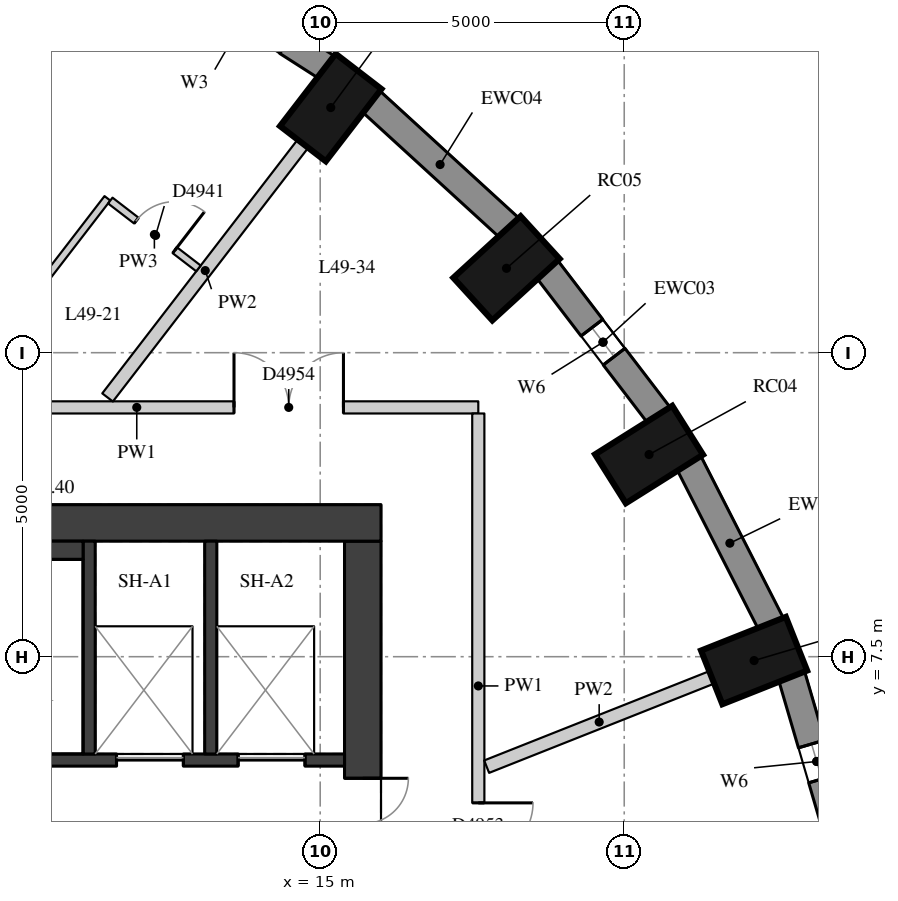
"""IFC4 building model, lengths in metres.
Left out: names, types, materials, properties, quantities, classifications, styles, units other than length and angle.
Written with IfcOpenShell. Run it as: python <this file> out.ifc"""

import sys

from ifc_helpers import new_model, si_unit, direction, frame, frame_2d, origin, origin_2d, place, context, subcontext, project, spatial, rectangle, extrude, element, fill, save


model = new_model("IFC4")
c1 = context("Model", 3, precision=1e-05, world=origin(), true_north=direction((0.0, 1.0)))
c2 = subcontext(c1, "Body", "Model", "MODEL_VIEW")
j1 = project(units=[si_unit("LENGTHUNIT", "METRE"), si_unit("PLANEANGLEUNIT", "RADIAN")], contexts=[c1])
p1 = place(None, origin())
s1 = spatial("IfcSite", under=j1, at=p1, CompositionType="ELEMENT")
p2 = place(p1, origin())
s2 = spatial("IfcBuilding", under=s1, at=p2, CompositionType="ELEMENT")
p3 = place(p2, frame((0.0, 0.0, 174.8)))
s3 = spatial("IfcBuildingStorey", under=s2, at=p3, CompositionType="ELEMENT", Elevation=174.8)
for number, where, z_axis, x_axis in (
    (1, (22.136, 7.436, 0.0), (0.0, 0.0, 1.0), (0.93, 0.369, 0.0)),
    (2, (20.408, 10.825, 0.0), (0.0, 0.0, 1.0), (0.846, 0.533, 0.0)),
    (3, (18.064, 13.888, 0.0), (0.0, 0.0, 1.0), (0.738, 0.675, 0.0)),
    (4, (15.173, 16.532, 0.0), (0.0, 0.0, 1.0), (0.61, 0.792, 0.0)),
):
    element("IfcColumn", number, at=place(p3, frame(where, z_axis=z_axis, x_axis=x_axis)), inside=s3, PredefinedType="COLUMN", context=c2, shape_type="SweptSolid", body=[
        extrude(rectangle(XDim=1.5, YDim=0.95, at=origin_2d()), origin(), (0.0, 0.0, 1.0), 3.3),
    ])
p4 = place(p3, frame((23.58, 4.362, 0.0), z_axis=(0.0, 0.0, 1.0), x_axis=(-0.281049481624, 0.959693278542, 0.0)))
e5 = element("IfcWall", 5, at=p4, inside=s3, PredefinedType="SOLIDWALL", context=c2, shape_type="SweptSolid", body=[
    extrude(rectangle(XDim=2.948, YDim=0.45, at=frame_2d((1.474, 0.0))), origin(), (0.0, 0.0, 1.0), 3.02),
])
p5 = place(p4, frame((1.174, 0.0, 0.4)))
e6 = element("IfcOpeningElement", 6, at=p5, cuts=e5, PredefinedType="OPENING", context=c2, shape_type="SweptSolid", body=[
    extrude(rectangle(XDim=0.6, YDim=1.75, at=frame_2d((0.3, 0.875))), frame((0.0, 0.235, 0.0), z_axis=(0.0, -1.0, 0.0), x_axis=(1.0, 0.0, 0.0)), (0.0, 0.0, 1.0), 0.47),
])
p6 = place(p3, frame((22.415, 8.037, 0.0), z_axis=(0.0, 0.0, 1.0), x_axis=(-0.454133999889, 0.890933392653, 0.0)))
e7 = element("IfcWall", 7, at=p6, inside=s3, PredefinedType="SOLIDWALL", context=c2, shape_type="SweptSolid", body=[
    extrude(rectangle(XDim=2.986, YDim=0.45, at=frame_2d((1.493, 0.0))), origin(), (0.0, 0.0, 1.0), 3.02),
])
p7 = place(p3, frame((20.574, 11.467, 0.0), z_axis=(0.0, 0.0, 1.0), x_axis=(-0.607817056371, 0.794077090706, 0.0)))
e8 = element("IfcWall", 8, at=p7, inside=s3, PredefinedType="SOLIDWALL", context=c2, shape_type="SweptSolid", body=[
    extrude(rectangle(XDim=3.037, YDim=0.45, at=frame_2d((1.519, 0.0))), origin(), (0.0, 0.0, 1.0), 3.02),
])
p8 = place(p7, frame((1.219, 0.0, 0.4)))
e9 = element("IfcOpeningElement", 9, at=p8, cuts=e8, PredefinedType="OPENING", context=c2, shape_type="SweptSolid", body=[
    extrude(rectangle(XDim=0.6, YDim=1.75, at=frame_2d((0.3, 0.875))), frame((0.0, 0.235, 0.0), z_axis=(0.0, -1.0, 0.0), x_axis=(1.0, 0.0, 0.0)), (0.0, 0.0, 1.0), 0.47),
])
p9 = place(p3, frame((18.113, 14.55, 0.0), z_axis=(0.0, 0.0, 1.0), x_axis=(-0.737808755941, 0.675009807082, 0.0)))
e10 = element("IfcWall", 10, at=p9, inside=s3, PredefinedType="SOLIDWALL", context=c2, shape_type="SweptSolid", body=[
    extrude(rectangle(XDim=3.094, YDim=0.45, at=frame_2d((1.547, 0.0))), origin(), (0.0, 0.0, 1.0), 3.02),
])
p10 = place(p3, frame((15.108, 17.193, 0.0), z_axis=(0.0, 0.0, 1.0), x_axis=(-0.842030726237, 0.539429565442, 0.0)))
e11 = element("IfcWall", 11, at=p10, inside=s3, PredefinedType="SOLIDWALL", context=c2, shape_type="SweptSolid", body=[
    extrude(rectangle(XDim=3.151, YDim=0.45, at=frame_2d((1.576, 0.0))), origin(), (0.0, 0.0, 1.0), 3.02),
])
p11 = place(p10, frame((0.776, 0.0, 0.4)))
e12 = element("IfcOpeningElement", 12, at=p11, cuts=e11, PredefinedType="OPENING", context=c2, shape_type="SweptSolid", body=[
    extrude(rectangle(XDim=1.6, YDim=1.75, at=frame_2d((0.8, 0.875))), frame((0.0, 0.235, 0.0), z_axis=(0.0, -1.0, 0.0), x_axis=(1.0, 0.0, 0.0)), (0.0, 0.0, 1.0), 0.47),
])
p12 = place(p3, frame((15.7, -9.4, 0.0), z_axis=(0.0, 0.0, 1.0), x_axis=(0.0, 1.0, 0.0)))
e13 = element("IfcWall", 13, at=p12, inside=s3, PredefinedType="SHEAR", context=c2, shape_type="SweptSolid", body=[
    extrude(rectangle(XDim=18.8, YDim=0.6, at=frame_2d((9.4, 0.0))), origin(), (0.0, 0.0, 1.0), 3.02),
])
p13 = place(p12, frame((13.4, 0.0, 0.0)))
e14 = element("IfcOpeningElement", 14, at=p13, cuts=e13, PredefinedType="OPENING", context=c2, shape_type="SweptSolid", body=[
    extrude(rectangle(XDim=1.5, YDim=2.1, at=frame_2d((0.75, 1.05))), frame((0.0, 0.31, 0.0), z_axis=(0.0, -1.0, 0.0), x_axis=(1.0, 0.0, 0.0)), (0.0, 0.0, 1.0), 0.62),
])
p14 = place(p12, frame((3.9, 0.0, 0.0)))
e15 = element("IfcOpeningElement", 15, at=p14, cuts=e13, PredefinedType="OPENING", context=c2, shape_type="SweptSolid", body=[
    extrude(rectangle(XDim=1.5, YDim=2.1, at=frame_2d((0.75, 1.05))), frame((0.0, 0.31, 0.0), z_axis=(0.0, -1.0, 0.0), x_axis=(1.0, 0.0, 0.0)), (0.0, 0.0, 1.0), 0.62),
])
p15 = place(p3, frame((4.0, 9.7, 0.0), z_axis=(0.0, 0.0, 1.0), x_axis=(1.0, 0.0, 0.0)))
e16 = element("IfcWall", 16, at=p15, inside=s3, PredefinedType="SHEAR", context=c2, shape_type="SweptSolid", body=[
    extrude(rectangle(XDim=12.0, YDim=0.6, at=frame_2d((6.0, 0.0))), origin(), (0.0, 0.0, 1.0), 3.02),
])
p16 = place(p3, frame((4.6, 5.8, 0.0), z_axis=(0.0, 0.0, 1.0), x_axis=(1.0, 0.0, 0.0)))
e17 = element("IfcWall", 17, at=p16, inside=s3, PredefinedType="SHEAR", context=c2, shape_type="SweptSolid", body=[
    extrude(rectangle(XDim=10.8, YDim=0.2, at=frame_2d((5.4, 0.0))), origin(), (0.0, 0.0, 1.0), 3.02),
])
p17 = place(p16, frame((7.05, 0.0, 0.0)))
e18 = element("IfcOpeningElement", 18, at=p17, cuts=e17, PredefinedType="OPENING", context=c2, shape_type="SweptSolid", body=[
    extrude(rectangle(XDim=1.1, YDim=2.1, at=frame_2d((0.55, 1.05))), frame((0.0, 0.11, 0.0), z_axis=(0.0, -1.0, 0.0), x_axis=(1.0, 0.0, 0.0)), (0.0, 0.0, 1.0), 0.22),
])
p18 = place(p16, frame((9.05, 0.0, 0.0)))
e19 = element("IfcOpeningElement", 19, at=p18, cuts=e17, PredefinedType="OPENING", context=c2, shape_type="SweptSolid", body=[
    extrude(rectangle(XDim=1.1, YDim=2.1, at=frame_2d((0.55, 1.05))), frame((0.0, 0.11, 0.0), z_axis=(0.0, -1.0, 0.0), x_axis=(1.0, 0.0, 0.0)), (0.0, 0.0, 1.0), 0.22),
])
for number, where, z_axis, x_axis in (
    (20, (11.2, 5.9, 0.0), (0.0, 0.0, 1.0), (0.0, 1.0, 0.0)),
    (21, (13.2, 5.9, 0.0), (0.0, 0.0, 1.0), (0.0, 1.0, 0.0)),
):
    element("IfcWall", number, at=place(p3, frame(where, z_axis=z_axis, x_axis=x_axis)), inside=s3, PredefinedType="SHEAR", context=c2, shape_type="SweptSolid", body=[
        extrude(rectangle(XDim=3.5, YDim=0.2, at=frame_2d((1.75, 0.0))), origin(), (0.0, 0.0, 1.0), 3.02),
    ])
p19 = place(p3, frame((6.22, 9.25, 0.0), z_axis=(0.0, 0.0, 1.0), x_axis=(1.0, 0.0, 0.0)))
e22 = element("IfcWall", 22, at=p19, inside=s3, PredefinedType="PARTITIONING", context=c2, shape_type="SweptSolid", body=[
    extrude(rectangle(XDim=4.88, YDim=0.3, at=frame_2d((2.44, 0.0))), origin(), (0.0, 0.0, 1.0), 3.02),
])
p20 = place(p3, frame((6.366, 11.6, 0.0), z_axis=(0.0, 0.0, 1.0), x_axis=(1.0, 0.0, 0.0)))
e23 = element("IfcWall", 23, at=p20, inside=s3, PredefinedType="PARTITIONING", context=c2, shape_type="SweptSolid", body=[
    extrude(rectangle(XDim=11.234, YDim=0.2, at=frame_2d((5.617, 0.0))), origin(), (0.0, 0.0, 1.0), 3.02),
])
p21 = place(p20, frame((1.086, 0.0, 0.0)))
e24 = element("IfcOpeningElement", 24, at=p21, cuts=e23, PredefinedType="OPENING", context=c2, shape_type="SweptSolid", body=[
    extrude(rectangle(XDim=1.1, YDim=2.1, at=frame_2d((0.55, 1.05))), frame((0.0, 0.11, 0.0), z_axis=(0.0, -1.0, 0.0), x_axis=(1.0, 0.0, 0.0)), (0.0, 0.0, 1.0), 0.22),
])
p22 = place(p20, frame((7.216, 0.0, 0.0)))
e25 = element("IfcOpeningElement", 25, at=p22, cuts=e23, PredefinedType="OPENING", context=c2, shape_type="SweptSolid", body=[
    extrude(rectangle(XDim=1.8, YDim=2.1, at=frame_2d((0.9, 1.05))), frame((0.0, 0.11, 0.0), z_axis=(0.0, -1.0, 0.0), x_axis=(1.0, 0.0, 0.0)), (0.0, 0.0, 1.0), 0.22),
])
p23 = place(p3, frame((17.6, 11.5, 0.0), z_axis=(0.0, 0.0, 1.0), x_axis=(0.0, -1.0, 0.0)))
e26 = element("IfcWall", 26, at=p23, inside=s3, PredefinedType="PARTITIONING", context=c2, shape_type="SweptSolid", body=[
    extrude(rectangle(XDim=8.962, YDim=0.2, at=frame_2d((4.481, 0.0))), origin(), (0.0, 0.0, 1.0), 3.02),
])
p24 = place(p23, frame((6.404, 0.0, 0.0)))
e27 = element("IfcOpeningElement", 27, at=p24, cuts=e26, PredefinedType="OPENING", context=c2, shape_type="SweptSolid", body=[
    extrude(rectangle(XDim=1.8, YDim=2.1, at=frame_2d((0.9, 1.05))), frame((0.0, 0.11, 0.0), z_axis=(0.0, -1.0, 0.0), x_axis=(1.0, 0.0, 0.0)), (0.0, 0.0, 1.0), 0.22),
])
p25 = place(p3, frame((21.439, 7.16, 0.0), z_axis=(0.0, 0.0, 1.0), x_axis=(-0.929517399972, -0.368778257426, 0.0)))
e28 = element("IfcWall", 28, at=p25, inside=s3, PredefinedType="PARTITIONING", context=c2, shape_type="SweptSolid", body=[
    extrude(rectangle(XDim=3.982, YDim=0.22, at=frame_2d((1.991, 0.0))), origin(), (0.0, 0.0, 1.0), 3.02),
])
p26 = place(p3, frame((14.716, 15.937, 0.0), z_axis=(0.0, 0.0, 1.0), x_axis=(-0.61000193202, -0.792399926131, 0.0)))
e29 = element("IfcWall", 29, at=p26, inside=s3, PredefinedType="PARTITIONING", context=c2, shape_type="SweptSolid", body=[
    extrude(rectangle(XDim=5.267, YDim=0.22, at=frame_2d((2.634, 0.0))), origin(), (0.0, 0.0, 1.0), 3.02),
])
p27 = place(p3, frame((8.955, 11.732, 0.0), z_axis=(0.0, 0.0, 1.0), x_axis=(0.609996270026, 0.79240428479, 0.0)))
e30 = element("IfcWall", 30, at=p27, inside=s3, PredefinedType="PARTITIONING", context=c2, shape_type="SweptSolid", body=[
    extrude(rectangle(XDim=4.173, YDim=0.12, at=frame_2d((2.087, 0.0))), origin(), (0.0, 0.0, 1.0), 3.02),
])
p28 = place(p3, frame((11.548, 15.002, 0.0), z_axis=(0.0, 0.0, 1.0), x_axis=(0.792445416108, -0.609942835428, 0.0)))
e31 = element("IfcWall", 31, at=p28, inside=s3, PredefinedType="PARTITIONING", context=c2, shape_type="SweptSolid", body=[
    extrude(rectangle(XDim=1.83, YDim=0.12, at=frame_2d((0.915, 0.0))), origin(), (0.0, 0.0, 1.0), 3.02),
])
p29 = place(p28, frame((0.54, 0.0, 0.0)))
e32 = element("IfcOpeningElement", 32, at=p29, cuts=e31, PredefinedType="OPENING", context=c2, shape_type="SweptSolid", body=[
    extrude(rectangle(XDim=0.8, YDim=2.1, at=frame_2d((0.4, 1.05))), frame((0.0, 0.07, 0.0), z_axis=(0.0, -1.0, 0.0), x_axis=(1.0, 0.0, 0.0)), (0.0, 0.0, 1.0), 0.14),
])
p30 = place(p5, origin())
e33 = element("IfcWindow", 33, at=p30, inside=s3, PartitioningType="SINGLE_PANEL", PredefinedType="WINDOW", context=c2, shape_type="SweptSolid", body=[
    extrude(rectangle(XDim=0.6, YDim=1.75, at=frame_2d((0.3, 0.875))), frame((0.0, 0.035, 0.0), z_axis=(0.0, -1.0, 0.0), x_axis=(1.0, 0.0, 0.0)), (0.0, 0.0, 1.0), 0.06),
])
fill(e6, e33)
p31 = place(p8, origin())
e34 = element("IfcWindow", 34, at=p31, inside=s3, PartitioningType="SINGLE_PANEL", PredefinedType="WINDOW", context=c2, shape_type="SweptSolid", body=[
    extrude(rectangle(XDim=0.6, YDim=1.75, at=frame_2d((0.3, 0.875))), frame((0.0, 0.035, 0.0), z_axis=(0.0, -1.0, 0.0), x_axis=(1.0, 0.0, 0.0)), (0.0, 0.0, 1.0), 0.06),
])
fill(e9, e34)
p32 = place(p13, origin())
e35 = element("IfcDoor", 35, at=p32, inside=s3, OperationType="DOUBLE_DOOR_SINGLE_SWING", PredefinedType="DOOR", context=c2, shape_type="SweptSolid", body=[
    extrude(rectangle(XDim=1.5, YDim=2.1, at=frame_2d((0.75, 1.05))), frame((0.0, 0.025, 0.0), z_axis=(0.0, -1.0, 0.0), x_axis=(1.0, 0.0, 0.0)), (0.0, 0.0, 1.0), 0.05),
])
fill(e14, e35)
p33 = place(p17, origin())
e36 = element("IfcDoor", 36, at=p33, inside=s3, OperationType="DOUBLE_DOOR_SLIDING", PredefinedType="DOOR", context=c2, shape_type="SweptSolid", body=[
    extrude(rectangle(XDim=1.1, YDim=2.1, at=frame_2d((0.55, 1.05))), frame((0.0, 0.025, 0.0), z_axis=(0.0, -1.0, 0.0), x_axis=(1.0, 0.0, 0.0)), (0.0, 0.0, 1.0), 0.05),
])
fill(e18, e36)
p34 = place(p18, origin())
e37 = element("IfcDoor", 37, at=p34, inside=s3, OperationType="DOUBLE_DOOR_SLIDING", PredefinedType="DOOR", context=c2, shape_type="SweptSolid", body=[
    extrude(rectangle(XDim=1.1, YDim=2.1, at=frame_2d((0.55, 1.05))), frame((0.0, 0.025, 0.0), z_axis=(0.0, -1.0, 0.0), x_axis=(1.0, 0.0, 0.0)), (0.0, 0.0, 1.0), 0.05),
])
fill(e19, e37)
p35 = place(p29, origin())
e38 = element("IfcDoor", 38, at=p35, inside=s3, OperationType="SINGLE_SWING_RIGHT", PredefinedType="DOOR", context=c2, shape_type="SweptSolid", body=[
    extrude(rectangle(XDim=0.8, YDim=2.1, at=frame_2d((0.4, 1.05))), frame((0.0, 0.025, 0.0), z_axis=(0.0, -1.0, 0.0), x_axis=(1.0, 0.0, 0.0)), (0.0, 0.0, 1.0), 0.05),
])
fill(e32, e38)
p36 = place(p24, origin())
e39 = element("IfcDoor", 39, at=p36, inside=s3, OperationType="DOUBLE_DOOR_SINGLE_SWING", PredefinedType="DOOR", context=c2, shape_type="SweptSolid", body=[
    extrude(rectangle(XDim=1.8, YDim=2.1, at=frame_2d((0.9, 1.05))), frame((0.0, 0.025, 0.0), z_axis=(0.0, -1.0, 0.0), x_axis=(1.0, 0.0, 0.0)), (0.0, 0.0, 1.0), 0.05),
])
fill(e27, e39)
p37 = place(p22, origin())
e40 = element("IfcDoor", 40, at=p37, inside=s3, OperationType="DOUBLE_DOOR_SINGLE_SWING", PredefinedType="DOOR", context=c2, shape_type="SweptSolid", body=[
    extrude(rectangle(XDim=1.8, YDim=2.1, at=frame_2d((0.9, 1.05))), frame((0.0, 0.025, 0.0), z_axis=(0.0, -1.0, 0.0), x_axis=(1.0, 0.0, 0.0)), (0.0, 0.0, 1.0), 0.05),
])
fill(e25, e40)
save(model, sys.argv[1])
